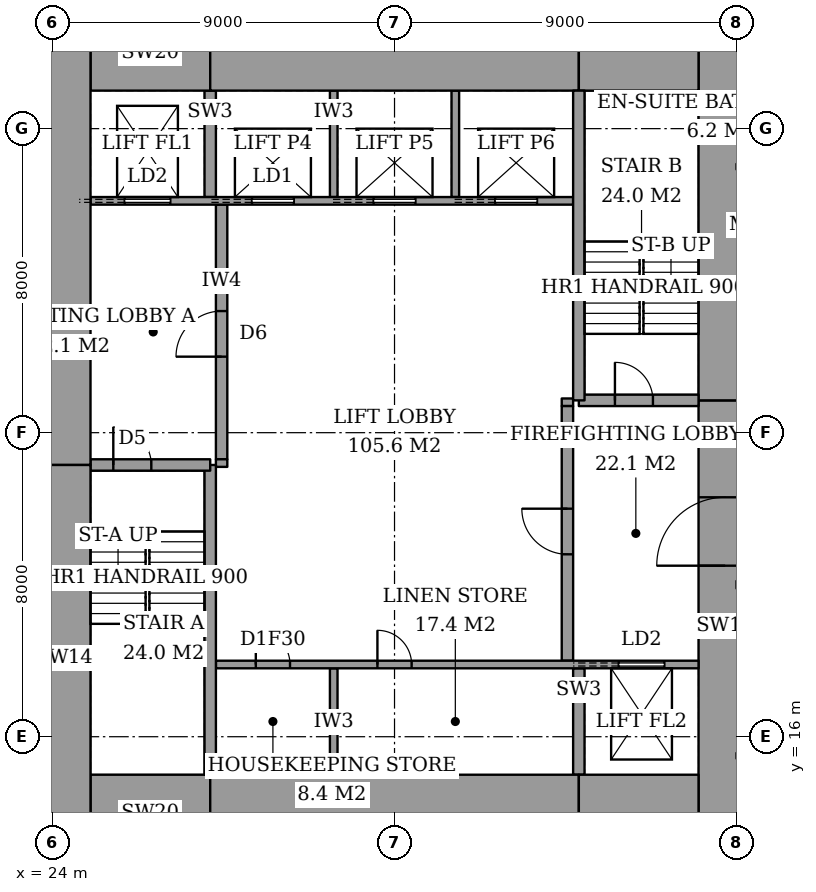
"""IFC4 building model, lengths in metres.
Left out: names, types, materials, properties, quantities, classifications, styles, units other than length and angle.
Written with IfcOpenShell. Run it as: python <this file> out.ifc"""

import sys

from ifc_helpers import new_model, si_unit, direction, frame, frame_2d, origin, place, context, subcontext, project, spatial, rectangle, extrude, element, fill, save


model = new_model("IFC4")
c1 = context("Model", 3, precision=1e-05, world=origin(), true_north=direction((0.0, 1.0)))
c2 = subcontext(c1, "Body", "Model", "MODEL_VIEW")
j1 = project(units=[si_unit("LENGTHUNIT", "METRE"), si_unit("PLANEANGLEUNIT", "RADIAN")], contexts=[c1])
p1 = place(None, origin())
s1 = spatial("IfcSite", under=j1, at=p1, CompositionType="ELEMENT")
p2 = place(p1, origin())
s2 = spatial("IfcBuilding", under=s1, at=p2, CompositionType="ELEMENT")
p3 = place(p2, frame((0.0, 0.0, 259.2)))
s3 = spatial("IfcBuildingStorey", under=s2, at=p3, CompositionType="ELEMENT", Elevation=259.2)
p4 = place(p3, frame((25.0, 14.0, 0.0), z_axis=(0.0, 0.0, 1.0), x_axis=(1.0, 0.0, 0.0)))
e1 = element("IfcWall", 1, at=p4, inside=s3, PredefinedType="SHEAR", context=c2, shape_type="SweptSolid", body=[
    extrude(rectangle(XDim=3.15, YDim=2.0, at=frame_2d((1.575, 0.0))), origin(), (0.0, 0.0, 1.0), 3.6),
])
p5 = place(p3, frame((28.15, 14.0, 0.0), z_axis=(0.0, 0.0, 1.0), x_axis=(1.0, 0.0, 0.0)))
e2 = element("IfcWall", 2, at=p5, inside=s3, PredefinedType="SHEAR", context=c2, shape_type="SweptSolid", body=[
    extrude(rectangle(XDim=9.7, YDim=2.0, at=frame_2d((4.85, 0.0))), origin(), (0.0, 0.0, 1.0), 3.6),
])
for number, where, z_axis, x_axis in (
    (3, (37.85, 14.0, 0.0), (0.0, 0.0, 1.0), (1.0, 0.0, 0.0)),
    (4, (25.0, 34.0, 0.0), (0.0, 0.0, 1.0), (1.0, 0.0, 0.0)),
):
    element("IfcWall", number, at=place(p3, frame(where, z_axis=z_axis, x_axis=x_axis)), inside=s3, PredefinedType="SHEAR", context=c2, shape_type="SweptSolid", body=[
        extrude(rectangle(XDim=3.15, YDim=2.0, at=frame_2d((1.575, 0.0))), origin(), (0.0, 0.0, 1.0), 3.6),
    ])
p6 = place(p3, frame((28.15, 34.0, 0.0), z_axis=(0.0, 0.0, 1.0), x_axis=(1.0, 0.0, 0.0)))
e5 = element("IfcWall", 5, at=p6, inside=s3, PredefinedType="SHEAR", context=c2, shape_type="SweptSolid", body=[
    extrude(rectangle(XDim=9.7, YDim=2.0, at=frame_2d((4.85, 0.0))), origin(), (0.0, 0.0, 1.0), 3.6),
])
p7 = place(p3, frame((37.85, 34.0, 0.0), z_axis=(0.0, 0.0, 1.0), x_axis=(1.0, 0.0, 0.0)))
e6 = element("IfcWall", 6, at=p7, inside=s3, PredefinedType="SHEAR", context=c2, shape_type="SweptSolid", body=[
    extrude(rectangle(XDim=3.15, YDim=2.0, at=frame_2d((1.575, 0.0))), origin(), (0.0, 0.0, 1.0), 3.6),
])
p8 = place(p3, frame((24.3, 13.0, 0.0), z_axis=(0.0, 0.0, 1.0), x_axis=(0.0, 1.0, 0.0)))
e7 = element("IfcWall", 7, at=p8, inside=s3, PredefinedType="SHEAR", context=c2, shape_type="SweptSolid", body=[
    extrude(rectangle(XDim=10.15, YDim=1.4, at=frame_2d((5.075, 0.0))), origin(), (0.0, 0.0, 1.0), 3.6),
])
p9 = place(p3, frame((24.3, 23.15, 0.0), z_axis=(0.0, 0.0, 1.0), x_axis=(0.0, 1.0, 0.0)))
e8 = element("IfcWall", 8, at=p9, inside=s3, PredefinedType="SHEAR", context=c2, shape_type="SweptSolid", body=[
    extrude(rectangle(XDim=11.85, YDim=1.4, at=frame_2d((5.925, 0.0))), origin(), (0.0, 0.0, 1.0), 3.6),
])
p10 = place(p3, frame((41.7, 13.0, 0.0), z_axis=(0.0, 0.0, 1.0), x_axis=(0.0, 1.0, 0.0)))
e9 = element("IfcWall", 9, at=p10, inside=s3, PredefinedType="SHEAR", context=c2, shape_type="SweptSolid", body=[
    extrude(rectangle(XDim=11.85, YDim=1.4, at=frame_2d((5.925, 0.0))), origin(), (0.0, 0.0, 1.0), 3.6),
])
p11 = place(p10, frame((7.5, 0.0, 0.0)))
e10 = element("IfcOpeningElement", 10, at=p11, cuts=e9, PredefinedType="OPENING", context=c2, shape_type="SweptSolid", body=[
    extrude(rectangle(XDim=1.8, YDim=2.4, at=frame_2d((0.9, 1.2))), frame((0.0, 0.71, 0.0), z_axis=(0.0, -1.0, 0.0), x_axis=(1.0, 0.0, 0.0)), (0.0, 0.0, 1.0), 1.42),
])
p12 = place(p3, frame((41.7, 24.85, 0.0), z_axis=(0.0, 0.0, 1.0), x_axis=(0.0, 1.0, 0.0)))
e11 = element("IfcWall", 11, at=p12, inside=s3, PredefinedType="SHEAR", context=c2, shape_type="SweptSolid", body=[
    extrude(rectangle(XDim=10.15, YDim=1.4, at=frame_2d((5.075, 0.0))), origin(), (0.0, 0.0, 1.0), 3.6),
])
p13 = place(p3, frame((28.15, 15.0, 0.0), z_axis=(0.0, 0.0, 1.0), x_axis=(0.0, 1.0, 0.0)))
e12 = element("IfcWall", 12, at=p13, inside=s3, PredefinedType="SHEAR", context=c2, shape_type="SweptSolid", body=[
    extrude(rectangle(XDim=8.15, YDim=0.3, at=frame_2d((4.075, 0.0))), origin(), (0.0, 0.0, 1.0), 3.6),
])
p14 = place(p3, frame((25.0, 23.15, 0.0), z_axis=(0.0, 0.0, 1.0), x_axis=(1.0, 0.0, 0.0)))
e13 = element("IfcWall", 13, at=p14, inside=s3, PredefinedType="SHEAR", context=c2, shape_type="SweptSolid", body=[
    extrude(rectangle(XDim=3.15, YDim=0.3, at=frame_2d((1.575, 0.0))), origin(), (0.0, 0.0, 1.0), 3.6),
])
p15 = place(p14, frame((0.6, 0.0, 0.0)))
e14 = element("IfcOpeningElement", 14, at=p15, cuts=e13, PredefinedType="OPENING", context=c2, shape_type="SweptSolid", body=[
    extrude(rectangle(XDim=1.0, YDim=2.1, at=frame_2d((0.5, 1.05))), frame((0.0, 0.16, 0.0), z_axis=(0.0, -1.0, 0.0), x_axis=(1.0, 0.0, 0.0)), (0.0, 0.0, 1.0), 0.32),
])
p16 = place(p3, frame((37.85, 24.85, 0.0), z_axis=(0.0, 0.0, 1.0), x_axis=(0.0, 1.0, 0.0)))
e15 = element("IfcWall", 15, at=p16, inside=s3, PredefinedType="SHEAR", context=c2, shape_type="SweptSolid", body=[
    extrude(rectangle(XDim=8.15, YDim=0.3, at=frame_2d((4.075, 0.0))), origin(), (0.0, 0.0, 1.0), 3.6),
])
p17 = place(p3, frame((37.85, 24.85, 0.0), z_axis=(0.0, 0.0, 1.0), x_axis=(1.0, 0.0, 0.0)))
e16 = element("IfcWall", 16, at=p17, inside=s3, PredefinedType="SHEAR", context=c2, shape_type="SweptSolid", body=[
    extrude(rectangle(XDim=3.15, YDim=0.3, at=frame_2d((1.575, 0.0))), origin(), (0.0, 0.0, 1.0), 3.6),
])
p18 = place(p17, frame((0.95, 0.0, 0.0)))
e17 = element("IfcOpeningElement", 17, at=p18, cuts=e16, PredefinedType="OPENING", context=c2, shape_type="SweptSolid", body=[
    extrude(rectangle(XDim=1.0, YDim=2.1, at=frame_2d((0.5, 1.05))), frame((0.0, 0.16, 0.0), z_axis=(0.0, -1.0, 0.0), x_axis=(1.0, 0.0, 0.0)), (0.0, 0.0, 1.0), 0.32),
])
p19 = place(p3, frame((28.45, 23.3, 0.0), z_axis=(0.0, 0.0, 1.0), x_axis=(0.0, 1.0, 0.0)))
e18 = element("IfcWall", 18, at=p19, inside=s3, PredefinedType="PARTITIONING", context=c2, shape_type="SweptSolid", body=[
    extrude(rectangle(XDim=6.7, YDim=0.3, at=frame_2d((3.35, 0.0))), origin(), (0.0, 0.0, 1.0), 3.6),
])
p20 = place(p19, frame((2.7, 0.0, 0.0)))
e19 = element("IfcOpeningElement", 19, at=p20, cuts=e18, PredefinedType="OPENING", context=c2, shape_type="SweptSolid", body=[
    extrude(rectangle(XDim=1.2, YDim=2.1, at=frame_2d((0.6, 1.05))), frame((0.0, 0.16, 0.0), z_axis=(0.0, -1.0, 0.0), x_axis=(1.0, 0.0, 0.0)), (0.0, 0.0, 1.0), 0.32),
])
p21 = place(p3, frame((37.55, 18.0, 0.0), z_axis=(0.0, 0.0, 1.0), x_axis=(0.0, 1.0, 0.0)))
e20 = element("IfcWall", 20, at=p21, inside=s3, PredefinedType="PARTITIONING", context=c2, shape_type="SweptSolid", body=[
    extrude(rectangle(XDim=6.7, YDim=0.3, at=frame_2d((3.35, 0.0))), origin(), (0.0, 0.0, 1.0), 3.6),
])
p22 = place(p21, frame((2.8, 0.0, 0.0)))
e21 = element("IfcOpeningElement", 21, at=p22, cuts=e20, PredefinedType="OPENING", context=c2, shape_type="SweptSolid", body=[
    extrude(rectangle(XDim=1.2, YDim=2.1, at=frame_2d((0.6, 1.05))), frame((0.0, 0.16, 0.0), z_axis=(0.0, -1.0, 0.0), x_axis=(1.0, 0.0, 0.0)), (0.0, 0.0, 1.0), 0.32),
])
p23 = place(p3, frame((28.3, 17.9, 0.0), z_axis=(0.0, 0.0, 1.0), x_axis=(1.0, 0.0, 0.0)))
e22 = element("IfcWall", 22, at=p23, inside=s3, PredefinedType="PARTITIONING", context=c2, shape_type="SweptSolid", body=[
    extrude(rectangle(XDim=12.7, YDim=0.2, at=frame_2d((6.35, 0.0))), origin(), (0.0, 0.0, 1.0), 3.6),
])
p24 = place(p23, frame((1.05, 0.0, 0.0)))
e23 = element("IfcOpeningElement", 23, at=p24, cuts=e22, PredefinedType="OPENING", context=c2, shape_type="SweptSolid", body=[
    extrude(rectangle(XDim=0.9, YDim=2.1, at=frame_2d((0.45, 1.05))), frame((0.0, 0.11, 0.0), z_axis=(0.0, -1.0, 0.0), x_axis=(1.0, 0.0, 0.0)), (0.0, 0.0, 1.0), 0.22),
])
p25 = place(p23, frame((4.25, 0.0, 0.0)))
e24 = element("IfcOpeningElement", 24, at=p25, cuts=e22, PredefinedType="OPENING", context=c2, shape_type="SweptSolid", body=[
    extrude(rectangle(XDim=0.9, YDim=2.1, at=frame_2d((0.45, 1.05))), frame((0.0, 0.11, 0.0), z_axis=(0.0, -1.0, 0.0), x_axis=(1.0, 0.0, 0.0)), (0.0, 0.0, 1.0), 0.22),
])
p26 = place(p23, frame((10.6, 0.0, 0.0)))
e25 = element("IfcOpeningElement", 25, at=p26, cuts=e22, PredefinedType="OPENING", context=c2, shape_type="SweptSolid", body=[
    extrude(rectangle(XDim=1.2, YDim=2.1, at=frame_2d((0.6, 1.05))), frame((0.0, 0.11, 0.0), z_axis=(0.0, -1.0, 0.0), x_axis=(1.0, 0.0, 0.0)), (0.0, 0.0, 1.0), 0.22),
])
p27 = place(p3, frame((25.0, 30.1, 0.0), z_axis=(0.0, 0.0, 1.0), x_axis=(1.0, 0.0, 0.0)))
e26 = element("IfcWall", 26, at=p27, inside=s3, PredefinedType="PARTITIONING", context=c2, shape_type="SweptSolid", body=[
    extrude(rectangle(XDim=12.7, YDim=0.2, at=frame_2d((6.35, 0.0))), origin(), (0.0, 0.0, 1.0), 3.6),
])
p28 = place(p27, frame((4.25, 0.0, 0.0)))
e27 = element("IfcOpeningElement", 27, at=p28, cuts=e26, PredefinedType="OPENING", context=c2, shape_type="SweptSolid", body=[
    extrude(rectangle(XDim=1.1, YDim=2.1, at=frame_2d((0.55, 1.05))), frame((0.0, 0.11, 0.0), z_axis=(0.0, -1.0, 0.0), x_axis=(1.0, 0.0, 0.0)), (0.0, 0.0, 1.0), 0.22),
])
p29 = place(p27, frame((7.45, 0.0, 0.0)))
e28 = element("IfcOpeningElement", 28, at=p29, cuts=e26, PredefinedType="OPENING", context=c2, shape_type="SweptSolid", body=[
    extrude(rectangle(XDim=1.1, YDim=2.1, at=frame_2d((0.55, 1.05))), frame((0.0, 0.11, 0.0), z_axis=(0.0, -1.0, 0.0), x_axis=(1.0, 0.0, 0.0)), (0.0, 0.0, 1.0), 0.22),
])
p30 = place(p27, frame((10.65, 0.0, 0.0)))
e29 = element("IfcOpeningElement", 29, at=p30, cuts=e26, PredefinedType="OPENING", context=c2, shape_type="SweptSolid", body=[
    extrude(rectangle(XDim=1.1, YDim=2.1, at=frame_2d((0.55, 1.05))), frame((0.0, 0.11, 0.0), z_axis=(0.0, -1.0, 0.0), x_axis=(1.0, 0.0, 0.0)), (0.0, 0.0, 1.0), 0.22),
])
p31 = place(p27, frame((0.9, 0.0, 0.0)))
e30 = element("IfcOpeningElement", 30, at=p31, cuts=e26, PredefinedType="OPENING", context=c2, shape_type="SweptSolid", body=[
    extrude(rectangle(XDim=1.2, YDim=2.1, at=frame_2d((0.6, 1.05))), frame((0.0, 0.11, 0.0), z_axis=(0.0, -1.0, 0.0), x_axis=(1.0, 0.0, 0.0)), (0.0, 0.0, 1.0), 0.22),
])
p32 = place(p3, frame((31.4, 15.0, 0.0), z_axis=(0.0, 0.0, 1.0), x_axis=(0.0, 1.0, 0.0)))
e31 = element("IfcWall", 31, at=p32, inside=s3, PredefinedType="PARTITIONING", context=c2, shape_type="SweptSolid", body=[
    extrude(rectangle(XDim=2.8, YDim=0.2, at=frame_2d((1.4, 0.0))), origin(), (0.0, 0.0, 1.0), 3.6),
])
p33 = place(p3, frame((37.85, 15.0, 0.0), z_axis=(0.0, 0.0, 1.0), x_axis=(0.0, 1.0, 0.0)))
e32 = element("IfcWall", 32, at=p33, inside=s3, PredefinedType="SHEAR", context=c2, shape_type="SweptSolid", body=[
    extrude(rectangle(XDim=2.8, YDim=0.3, at=frame_2d((1.4, 0.0))), origin(), (0.0, 0.0, 1.0), 3.6),
])
for number, where, z_axis, x_axis in (
    (33, (31.4, 30.2, 0.0), (0.0, 0.0, 1.0), (0.0, 1.0, 0.0)),
    (34, (34.6, 30.2, 0.0), (0.0, 0.0, 1.0), (0.0, 1.0, 0.0)),
):
    element("IfcWall", number, at=place(p3, frame(where, z_axis=z_axis, x_axis=x_axis)), inside=s3, PredefinedType="PARTITIONING", context=c2, shape_type="SweptSolid", body=[
        extrude(rectangle(XDim=2.8, YDim=0.2, at=frame_2d((1.4, 0.0))), origin(), (0.0, 0.0, 1.0), 3.6),
    ])
p34 = place(p3, frame((28.15, 30.2, 0.0), z_axis=(0.0, 0.0, 1.0), x_axis=(0.0, 1.0, 0.0)))
e35 = element("IfcWall", 35, at=p34, inside=s3, PredefinedType="SHEAR", context=c2, shape_type="SweptSolid", body=[
    extrude(rectangle(XDim=2.8, YDim=0.3, at=frame_2d((1.4, 0.0))), origin(), (0.0, 0.0, 1.0), 3.6),
])
for number, where, z_axis, x_axis in (
    (36, (28.3, 23.2, 0.0), (0.0, 0.0, 1.0), (1.0, 0.0, 0.0)),
    (37, (37.4, 24.8, 0.0), (0.0, 0.0, 1.0), (1.0, 0.0, 0.0)),
):
    element("IfcWall", number, at=place(p3, frame(where, z_axis=z_axis, x_axis=x_axis)), inside=s3, PredefinedType="PARTITIONING", context=c2, shape_type="SweptSolid", body=[
        extrude(rectangle(XDim=0.3, YDim=0.2, at=frame_2d((0.15, 0.0))), origin(), (0.0, 0.0, 1.0), 3.6),
    ])
p35 = place(p15, origin())
e38 = element("IfcDoor", 38, at=p35, inside=s3, OperationType="SINGLE_SWING_RIGHT", PredefinedType="DOOR", context=c2, shape_type="SweptSolid", body=[
    extrude(rectangle(XDim=1.0, YDim=2.1, at=frame_2d((0.5, 1.05))), frame((0.0, 0.025, 0.0), z_axis=(0.0, -1.0, 0.0), x_axis=(1.0, 0.0, 0.0)), (0.0, 0.0, 1.0), 0.05),
])
fill(e14, e38)
p36 = place(p18, origin())
e39 = element("IfcDoor", 39, at=p36, inside=s3, OperationType="SINGLE_SWING_RIGHT", PredefinedType="DOOR", context=c2, shape_type="SweptSolid", body=[
    extrude(rectangle(XDim=1.0, YDim=2.1, at=frame_2d((0.5, 1.05))), frame((0.0, 0.025, 0.0), z_axis=(0.0, -1.0, 0.0), x_axis=(1.0, 0.0, 0.0)), (0.0, 0.0, 1.0), 0.05),
])
fill(e17, e39)
p37 = place(p20, origin())
e40 = element("IfcDoor", 40, at=p37, inside=s3, OperationType="SINGLE_SWING_RIGHT", PredefinedType="DOOR", context=c2, shape_type="SweptSolid", body=[
    extrude(rectangle(XDim=1.2, YDim=2.1, at=frame_2d((0.6, 1.05))), frame((0.0, 0.025, 0.0), z_axis=(0.0, -1.0, 0.0), x_axis=(1.0, 0.0, 0.0)), (0.0, 0.0, 1.0), 0.05),
])
fill(e19, e40)
p38 = place(p22, origin())
e41 = element("IfcDoor", 41, at=p38, inside=s3, OperationType="SINGLE_SWING_LEFT", PredefinedType="DOOR", context=c2, shape_type="SweptSolid", body=[
    extrude(rectangle(XDim=1.2, YDim=2.1, at=frame_2d((0.6, 1.05))), frame((0.0, 0.025, 0.0), z_axis=(0.0, -1.0, 0.0), x_axis=(1.0, 0.0, 0.0)), (0.0, 0.0, 1.0), 0.05),
])
fill(e21, e41)
p39 = place(p11, origin())
e42 = element("IfcDoor", 42, at=p39, inside=s3, OperationType="DOUBLE_DOOR_DOUBLE_SWING", PredefinedType="DOOR", context=c2, shape_type="SweptSolid", body=[
    extrude(rectangle(XDim=1.8, YDim=2.4, at=frame_2d((0.9, 1.2))), frame((0.0, 0.025, 0.0), z_axis=(0.0, -1.0, 0.0), x_axis=(1.0, 0.0, 0.0)), (0.0, 0.0, 1.0), 0.05),
])
fill(e10, e42)
p40 = place(p24, origin())
e43 = element("IfcDoor", 43, at=p40, inside=s3, OperationType="SINGLE_SWING_RIGHT", PredefinedType="DOOR", context=c2, shape_type="SweptSolid", body=[
    extrude(rectangle(XDim=0.9, YDim=2.1, at=frame_2d((0.45, 1.05))), frame((0.0, 0.025, 0.0), z_axis=(0.0, -1.0, 0.0), x_axis=(1.0, 0.0, 0.0)), (0.0, 0.0, 1.0), 0.05),
])
fill(e23, e43)
p41 = place(p25, origin())
e44 = element("IfcDoor", 44, at=p41, inside=s3, OperationType="SINGLE_SWING_RIGHT", PredefinedType="DOOR", context=c2, shape_type="SweptSolid", body=[
    extrude(rectangle(XDim=0.9, YDim=2.1, at=frame_2d((0.45, 1.05))), frame((0.0, 0.025, 0.0), z_axis=(0.0, -1.0, 0.0), x_axis=(1.0, 0.0, 0.0)), (0.0, 0.0, 1.0), 0.05),
])
fill(e24, e44)
p42 = place(p28, origin())
e45 = element("IfcDoor", 45, at=p42, inside=s3, OperationType="SLIDING_TO_LEFT", PredefinedType="DOOR", context=c2, shape_type="SweptSolid", body=[
    extrude(rectangle(XDim=1.1, YDim=2.1, at=frame_2d((0.55, 1.05))), frame((0.0, 0.025, 0.0), z_axis=(0.0, -1.0, 0.0), x_axis=(1.0, 0.0, 0.0)), (0.0, 0.0, 1.0), 0.05),
])
fill(e27, e45)
p43 = place(p29, origin())
e46 = element("IfcDoor", 46, at=p43, inside=s3, OperationType="SLIDING_TO_LEFT", PredefinedType="DOOR", context=c2, shape_type="SweptSolid", body=[
    extrude(rectangle(XDim=1.1, YDim=2.1, at=frame_2d((0.55, 1.05))), frame((0.0, 0.025, 0.0), z_axis=(0.0, -1.0, 0.0), x_axis=(1.0, 0.0, 0.0)), (0.0, 0.0, 1.0), 0.05),
])
fill(e28, e46)
p44 = place(p30, origin())
e47 = element("IfcDoor", 47, at=p44, inside=s3, OperationType="SLIDING_TO_LEFT", PredefinedType="DOOR", context=c2, shape_type="SweptSolid", body=[
    extrude(rectangle(XDim=1.1, YDim=2.1, at=frame_2d((0.55, 1.05))), frame((0.0, 0.025, 0.0), z_axis=(0.0, -1.0, 0.0), x_axis=(1.0, 0.0, 0.0)), (0.0, 0.0, 1.0), 0.05),
])
fill(e29, e47)
p45 = place(p31, origin())
e48 = element("IfcDoor", 48, at=p45, inside=s3, OperationType="SLIDING_TO_LEFT", PredefinedType="DOOR", context=c2, shape_type="SweptSolid", body=[
    extrude(rectangle(XDim=1.2, YDim=2.1, at=frame_2d((0.6, 1.05))), frame((0.0, 0.025, 0.0), z_axis=(0.0, -1.0, 0.0), x_axis=(1.0, 0.0, 0.0)), (0.0, 0.0, 1.0), 0.05),
])
fill(e30, e48)
p46 = place(p26, origin())
e49 = element("IfcDoor", 49, at=p46, inside=s3, OperationType="SLIDING_TO_LEFT", PredefinedType="DOOR", context=c2, shape_type="SweptSolid", body=[
    extrude(rectangle(XDim=1.2, YDim=2.1, at=frame_2d((0.6, 1.05))), frame((0.0, 0.025, 0.0), z_axis=(0.0, -1.0, 0.0), x_axis=(1.0, 0.0, 0.0)), (0.0, 0.0, 1.0), 0.05),
])
fill(e25, e49)
save(model, sys.argv[1])
